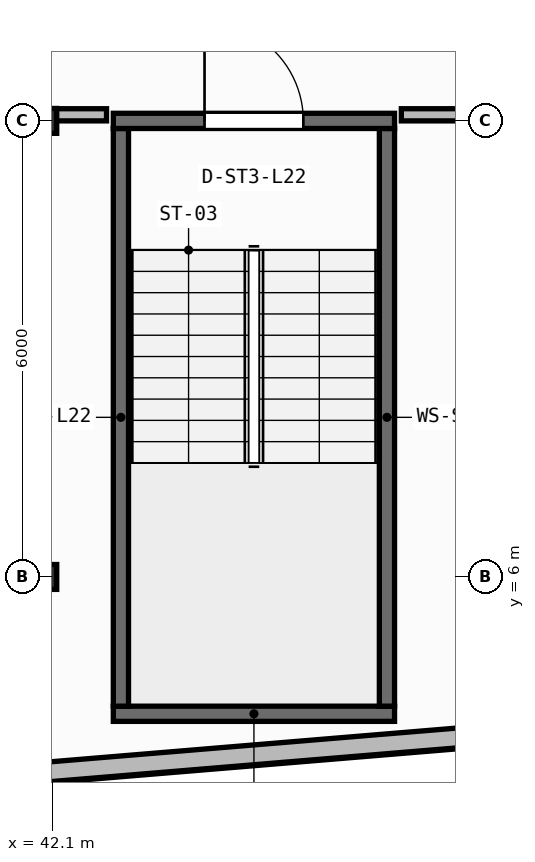
"""IFC4 building model, lengths in metres.
Left out: names, types, materials, properties, quantities, classifications, styles, units other than length and angle.
Written with IfcOpenShell. Run it as: python <this file> out.ifc"""

import sys

from ifc_helpers import new_model, si_unit, direction, frame, frame_2d, origin, origin_2d, place, context, subcontext, project, spatial, rectangle, i_section, extrude, element, fill, save


model = new_model("IFC4")
c1 = context("Model", 3, precision=1e-05, world=origin(), true_north=direction((0.0, 1.0)))
c2 = subcontext(c1, "Body", "Model", "MODEL_VIEW")
j1 = project(units=[si_unit("LENGTHUNIT", "METRE"), si_unit("PLANEANGLEUNIT", "RADIAN")], contexts=[c1])
p1 = place(None, origin())
s1 = spatial("IfcSite", under=j1, at=p1, CompositionType="ELEMENT")
p2 = place(p1, origin())
s2 = spatial("IfcBuilding", under=s1, at=p2, CompositionType="ELEMENT")
p3 = place(p2, frame((0.0, 0.0, 89.65)))
s3 = spatial("IfcBuildingStorey", under=s2, at=p3, CompositionType="ELEMENT", Elevation=89.65)
for number, where, z_axis, x_axis in (
    (1, (42.0, 6.0, 0.0), (0.0, 0.0, 1.0), (1.0, 0.0, 0.0)),
    (2, (42.0, 12.0, 0.0), (0.0, 0.0, 1.0), (1.0, 0.0, 0.0)),
):
    element("IfcColumn", number, at=place(p3, frame(where, z_axis=z_axis, x_axis=x_axis)), inside=s3, PredefinedType="COLUMN", context=c2, shape_type="SweptSolid", body=[
        extrude(i_section(OverallWidth=0.311, OverallDepth=0.327, WebThickness=0.016, FlangeThickness=0.025, FilletRadius=0.017, at=origin_2d()), origin(), (0.0, 0.0, 1.0), 3.95),
    ])
p4 = place(p3, frame((2.76, 0.174, 0.0), z_axis=(0.0, 0.0, 1.0), x_axis=(0.996571478456, 0.082736257641, 0.0)))
e3 = element("IfcWall", 3, at=p4, inside=s3, PredefinedType="STANDARD", context=c2, shape_type="SweptSolid", body=[
    extrude(rectangle(XDim=52.861, YDim=0.26, at=frame_2d((26.431, 0.0))), origin(), (0.0, 0.0, 1.0), 3.71),
])
p5 = place(p4, frame((25.231, 0.0, 0.9)))
e4 = element("IfcOpeningElement", 4, at=p5, cuts=e3, PredefinedType="OPENING", context=c2, shape_type="SweptSolid", body=[
    extrude(rectangle(XDim=2.4, YDim=1.65, at=frame_2d((1.2, 0.825))), frame((0.0, 0.14, 0.0), z_axis=(0.0, -1.0, 0.0), x_axis=(1.0, 0.0, 0.0)), (0.0, 0.0, 1.0), 0.28),
])
p6 = place(p3, frame((42.9, 4.2, 0.0), z_axis=(0.0, 0.0, 1.0), x_axis=(1.0, 0.0, 0.0)))
e5 = element("IfcWall", 5, at=p6, inside=s3, PredefinedType="SHEAR", context=c2, shape_type="SweptSolid", body=[
    extrude(rectangle(XDim=3.7, YDim=0.2, at=frame_2d((1.85, 0.0))), origin(), (0.0, 0.0, 1.0), 3.71),
])
for number, where, z_axis, x_axis in (
    (6, (43.0, 4.3, 0.0), (0.0, 0.0, 1.0), (0.0, 1.0, 0.0)),
    (7, (46.5, 4.3, 0.0), (0.0, 0.0, 1.0), (0.0, 1.0, 0.0)),
):
    element("IfcWall", number, at=place(p3, frame(where, z_axis=z_axis, x_axis=x_axis)), inside=s3, PredefinedType="SHEAR", context=c2, shape_type="SweptSolid", body=[
        extrude(rectangle(XDim=7.6, YDim=0.2, at=frame_2d((3.8, 0.0))), origin(), (0.0, 0.0, 1.0), 3.71),
    ])
p7 = place(p3, frame((42.9, 12.0, 0.0), z_axis=(0.0, 0.0, 1.0), x_axis=(1.0, 0.0, 0.0)))
e8 = element("IfcWall", 8, at=p7, inside=s3, PredefinedType="SHEAR", context=c2, shape_type="SweptSolid", body=[
    extrude(rectangle(XDim=3.7, YDim=0.2, at=frame_2d((1.85, 0.0))), origin(), (0.0, 0.0, 1.0), 3.71),
])
p8 = place(p7, frame((1.2, 0.0, 0.0)))
e9 = element("IfcOpeningElement", 9, at=p8, cuts=e8, PredefinedType="OPENING", context=c2, shape_type="SweptSolid", body=[
    extrude(rectangle(XDim=1.3, YDim=2.15, at=frame_2d((0.65, 1.075))), frame((0.0, 0.11, 0.0), z_axis=(0.0, -1.0, 0.0), x_axis=(1.0, 0.0, 0.0)), (0.0, 0.0, 1.0), 0.22),
])
p9 = place(p3, frame((31.63, 12.08, 0.0), z_axis=(0.0, 0.0, 1.0), x_axis=(1.0, 0.0, 0.0)))
e10 = element("IfcWall", 10, at=p9, inside=s3, PredefinedType="PARTITIONING", context=c2, shape_type="SweptSolid", body=[
    extrude(rectangle(XDim=11.181, YDim=0.16, at=frame_2d((5.59, 0.0))), origin(), (0.0, 0.0, 1.0), 3.073),
])
p10 = place(p3, frame((46.689, 12.08, 0.0), z_axis=(0.0, 0.0, 1.0), x_axis=(1.0, 0.0, 0.0)))
e11 = element("IfcWall", 11, at=p10, inside=s3, PredefinedType="PARTITIONING", context=c2, shape_type="SweptSolid", body=[
    extrude(rectangle(XDim=3.011, YDim=0.16, at=frame_2d((1.505, 0.0))), origin(), (0.0, 0.0, 1.0), 3.073),
])
p11 = place(p8, origin())
e12 = element("IfcDoor", 12, at=p11, inside=s3, OperationType="SINGLE_SWING_LEFT", PredefinedType="DOOR", context=c2, shape_type="SweptSolid", body=[
    extrude(rectangle(XDim=1.3, YDim=2.15, at=frame_2d((0.65, 1.075))), frame((0.0, 0.025, 0.0), z_axis=(0.0, -1.0, 0.0), x_axis=(1.0, 0.0, 0.0)), (0.0, 0.0, 1.0), 0.05),
])
fill(e9, e12)
save(model, sys.argv[1])
